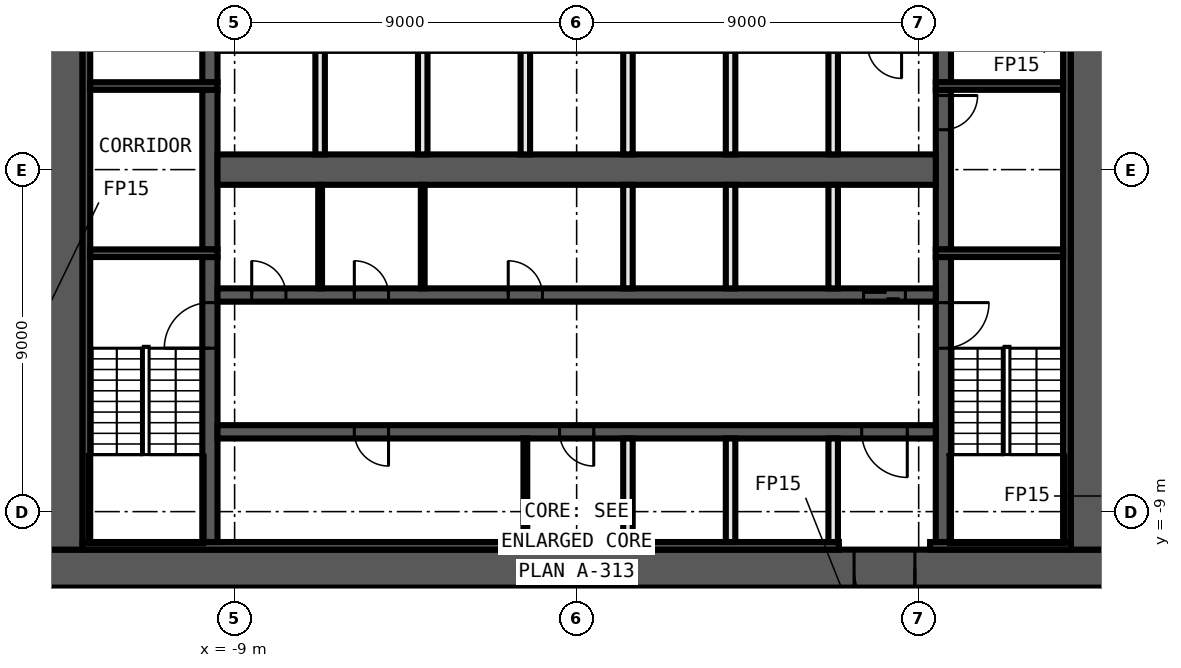
"""IFC4 building model, lengths in metres.
Left out: names, types, materials, properties, quantities, classifications, styles, units other than length and angle.
Written with IfcOpenShell. Run it as: python <this file> out.ifc"""

import sys

from ifc_helpers import new_model, si_unit, direction, frame, frame_2d, origin, place, context, subcontext, project, spatial, rectangle, extrude, element, fill, save


model = new_model("IFC4")
c1 = context("Model", 3, precision=1e-05, world=origin(), true_north=direction((0.0, 1.0)))
c2 = subcontext(c1, "Body", "Model", "MODEL_VIEW")
j1 = project(units=[si_unit("LENGTHUNIT", "METRE"), si_unit("PLANEANGLEUNIT", "RADIAN")], contexts=[c1])
p1 = place(None, origin())
s1 = spatial("IfcSite", under=j1, at=p1, CompositionType="ELEMENT")
p2 = place(p1, origin())
s2 = spatial("IfcBuilding", under=s1, at=p2, CompositionType="ELEMENT")
p3 = place(p2, frame((0.0, 0.0, 98.9)))
s3 = spatial("IfcBuildingStorey", under=s2, at=p3, CompositionType="ELEMENT", Elevation=98.9)
p4 = place(p3, frame((14.0, -10.5, 0.0), z_axis=(0.0, 0.0, 1.0), x_axis=(-1.0, 0.0, 0.0)))
e1 = element("IfcWall", 1, at=p4, inside=s3, PredefinedType="SHEAR", context=c2, shape_type="SweptSolid", body=[
    extrude(rectangle(XDim=28.0, YDim=1.0, at=frame_2d((14.0, 0.0))), origin(), (0.0, 0.0, 1.0), 3.25),
])
p5 = place(p4, frame((5.1, 0.0, 0.0)))
e2 = element("IfcOpeningElement", 2, at=p5, cuts=e1, PredefinedType="OPENING", context=c2, shape_type="SweptSolid", body=[
    extrude(rectangle(XDim=1.6, YDim=2.1, at=frame_2d((0.8, 1.05))), frame((0.0, 0.51, 0.0), z_axis=(0.0, -1.0, 0.0), x_axis=(1.0, 0.0, 0.0)), (0.0, 0.0, 1.0), 1.02),
])
for number, where, z_axis, x_axis in (
    (3, (13.5, 10.0, 0.0), (0.0, 0.0, 1.0), (0.0, -1.0, 0.0)),
    (4, (-13.5, -10.0, 0.0), (0.0, 0.0, 1.0), (0.0, 1.0, 0.0)),
):
    element("IfcWall", number, at=place(p3, frame(where, z_axis=z_axis, x_axis=x_axis)), inside=s3, PredefinedType="SHEAR", context=c2, shape_type="SweptSolid", body=[
        extrude(rectangle(XDim=20.0, YDim=1.0, at=frame_2d((10.0, 0.0))), origin(), (0.0, 0.0, 1.0), 3.25),
    ])
p6 = place(p3, frame((13.0, -9.9, 0.0), z_axis=(0.0, 0.0, 1.0), x_axis=(-1.0, 0.0, 0.0)))
e5 = element("IfcWall", 5, at=p6, inside=s3, PredefinedType="SHEAR", context=c2, shape_type="SweptSolid", body=[
    extrude(rectangle(XDim=3.7, YDim=0.2, at=frame_2d((1.85, 0.0))), origin(), (0.0, 0.0, 1.0), 3.25),
])
p7 = place(p3, frame((6.9, -9.9, 0.0), z_axis=(0.0, 0.0, 1.0), x_axis=(-1.0, 0.0, 0.0)))
e6 = element("IfcWall", 6, at=p7, inside=s3, PredefinedType="SHEAR", context=c2, shape_type="SweptSolid", body=[
    extrude(rectangle(XDim=19.9, YDim=0.2, at=frame_2d((9.95, 0.0))), origin(), (0.0, 0.0, 1.0), 3.25),
])
for number, where, z_axis, x_axis in (
    (7, (12.9, 9.8, 0.0), (0.0, 0.0, 1.0), (0.0, -1.0, 0.0)),
    (8, (-12.9, -9.8, 0.0), (0.0, 0.0, 1.0), (0.0, 1.0, 0.0)),
):
    element("IfcWall", number, at=place(p3, frame(where, z_axis=z_axis, x_axis=x_axis)), inside=s3, PredefinedType="SHEAR", context=c2, shape_type="SweptSolid", body=[
        extrude(rectangle(XDim=19.6, YDim=0.2, at=frame_2d((9.8, 0.0))), origin(), (0.0, 0.0, 1.0), 3.25),
    ])
p8 = place(p3, frame((9.65, -2.3, 0.0), z_axis=(0.0, 0.0, 1.0), x_axis=(0.0, -1.0, 0.0)))
e9 = element("IfcWall", 9, at=p8, inside=s3, PredefinedType="SHEAR", context=c2, shape_type="SweptSolid", body=[
    extrude(rectangle(XDim=7.5, YDim=0.4, at=frame_2d((3.75, 0.0))), origin(), (0.0, 0.0, 1.0), 3.25),
])
p9 = place(p8, frame((1.2, 0.0, 0.0)))
e10 = element("IfcOpeningElement", 10, at=p9, cuts=e9, PredefinedType="OPENING", context=c2, shape_type="SweptSolid", body=[
    extrude(rectangle(XDim=1.2, YDim=2.1, at=frame_2d((0.6, 1.05))), frame((0.0, 0.21, 0.0), z_axis=(0.0, -1.0, 0.0), x_axis=(1.0, 0.0, 0.0)), (0.0, 0.0, 1.0), 0.42),
])
p10 = place(p3, frame((9.65, 2.1, 0.0), z_axis=(0.0, 0.0, 1.0), x_axis=(0.0, -1.0, 0.0)))
e11 = element("IfcWall", 11, at=p10, inside=s3, PredefinedType="SHEAR", context=c2, shape_type="SweptSolid", body=[
    extrude(rectangle(XDim=4.2, YDim=0.4, at=frame_2d((2.1, 0.0))), origin(), (0.0, 0.0, 1.0), 3.25),
])
p11 = place(p10, frame((0.15, 0.0, 0.0)))
e12 = element("IfcOpeningElement", 12, at=p11, cuts=e11, PredefinedType="OPENING", context=c2, shape_type="SweptSolid", body=[
    extrude(rectangle(XDim=0.9, YDim=2.1, at=frame_2d((0.45, 1.05))), frame((0.0, 0.21, 0.0), z_axis=(0.0, -1.0, 0.0), x_axis=(1.0, 0.0, 0.0)), (0.0, 0.0, 1.0), 0.42),
])
p12 = place(p3, frame((9.65, 9.8, 0.0), z_axis=(0.0, 0.0, 1.0), x_axis=(0.0, -1.0, 0.0)))
e13 = element("IfcWall", 13, at=p12, inside=s3, PredefinedType="SHEAR", context=c2, shape_type="SweptSolid", body=[
    extrude(rectangle(XDim=7.5, YDim=0.4, at=frame_2d((3.75, 0.0))), origin(), (0.0, 0.0, 1.0), 3.25),
])
p13 = place(p12, frame((5.1, 0.0, 0.0)))
e14 = element("IfcOpeningElement", 14, at=p13, cuts=e13, PredefinedType="OPENING", context=c2, shape_type="SweptSolid", body=[
    extrude(rectangle(XDim=1.2, YDim=2.1, at=frame_2d((0.6, 1.05))), frame((0.0, 0.21, 0.0), z_axis=(0.0, -1.0, 0.0), x_axis=(1.0, 0.0, 0.0)), (0.0, 0.0, 1.0), 0.42),
])
p14 = place(p3, frame((-9.65, -9.8, 0.0), z_axis=(0.0, 0.0, 1.0), x_axis=(0.0, 1.0, 0.0)))
e15 = element("IfcWall", 15, at=p14, inside=s3, PredefinedType="SHEAR", context=c2, shape_type="SweptSolid", body=[
    extrude(rectangle(XDim=7.5, YDim=0.4, at=frame_2d((3.75, 0.0))), origin(), (0.0, 0.0, 1.0), 3.25),
])
p15 = place(p14, frame((5.1, 0.0, 0.0)))
e16 = element("IfcOpeningElement", 16, at=p15, cuts=e15, PredefinedType="OPENING", context=c2, shape_type="SweptSolid", body=[
    extrude(rectangle(XDim=1.2, YDim=2.1, at=frame_2d((0.6, 1.05))), frame((0.0, 0.21, 0.0), z_axis=(0.0, -1.0, 0.0), x_axis=(1.0, 0.0, 0.0)), (0.0, 0.0, 1.0), 0.42),
])
p16 = place(p3, frame((-9.65, -2.1, 0.0), z_axis=(0.0, 0.0, 1.0), x_axis=(0.0, 1.0, 0.0)))
e17 = element("IfcWall", 17, at=p16, inside=s3, PredefinedType="SHEAR", context=c2, shape_type="SweptSolid", body=[
    extrude(rectangle(XDim=4.2, YDim=0.4, at=frame_2d((2.1, 0.0))), origin(), (0.0, 0.0, 1.0), 3.25),
])
p17 = place(p3, frame((-9.65, 2.3, 0.0), z_axis=(0.0, 0.0, 1.0), x_axis=(0.0, 1.0, 0.0)))
e18 = element("IfcWall", 18, at=p17, inside=s3, PredefinedType="SHEAR", context=c2, shape_type="SweptSolid", body=[
    extrude(rectangle(XDim=7.5, YDim=0.4, at=frame_2d((3.75, 0.0))), origin(), (0.0, 0.0, 1.0), 3.25),
])
p18 = place(p17, frame((1.2, 0.0, 0.0)))
e19 = element("IfcOpeningElement", 19, at=p18, cuts=e18, PredefinedType="OPENING", context=c2, shape_type="SweptSolid", body=[
    extrude(rectangle(XDim=1.2, YDim=2.1, at=frame_2d((0.6, 1.05))), frame((0.0, 0.21, 0.0), z_axis=(0.0, -1.0, 0.0), x_axis=(1.0, 0.0, 0.0)), (0.0, 0.0, 1.0), 0.42),
])
for number, where, z_axis, x_axis in (
    (20, (9.45, 2.2, 0.0), (0.0, 0.0, 1.0), (1.0, 0.0, 0.0)),
    (21, (-9.45, 2.2, 0.0), (0.0, 0.0, 1.0), (-1.0, 0.0, 0.0)),
    (22, (9.45, -2.2, 0.0), (0.0, 0.0, 1.0), (1.0, 0.0, 0.0)),
    (23, (-9.45, -2.2, 0.0), (0.0, 0.0, 1.0), (-1.0, 0.0, 0.0)),
):
    element("IfcWall", number, at=place(p3, frame(where, z_axis=z_axis, x_axis=x_axis)), inside=s3, PredefinedType="SHEAR", context=c2, shape_type="SweptSolid", body=[
        extrude(rectangle(XDim=3.35, YDim=0.2, at=frame_2d((1.675, 0.0))), origin(), (0.0, 0.0, 1.0), 3.25),
    ])
p19 = place(p3, frame((-9.45, -3.3, 0.0), z_axis=(0.0, 0.0, 1.0), x_axis=(1.0, 0.0, 0.0)))
e24 = element("IfcWall", 24, at=p19, inside=s3, PredefinedType="SHEAR", context=c2, shape_type="SweptSolid", body=[
    extrude(rectangle(XDim=18.9, YDim=0.35, at=frame_2d((9.45, 0.0))), origin(), (0.0, 0.0, 1.0), 3.25),
])
p20 = place(p19, frame((17.0, 0.0, 0.0)))
e25 = element("IfcOpeningElement", 25, at=p20, cuts=e24, PredefinedType="OPENING", context=c2, shape_type="SweptSolid", body=[
    extrude(rectangle(XDim=1.1, YDim=2.1, at=frame_2d((0.55, 1.05))), frame((0.0, 0.185, 0.0), z_axis=(0.0, -1.0, 0.0), x_axis=(1.0, 0.0, 0.0)), (0.0, 0.0, 1.0), 0.37),
])
p21 = place(p19, frame((0.9, 0.0, 0.0)))
e26 = element("IfcOpeningElement", 26, at=p21, cuts=e24, PredefinedType="OPENING", context=c2, shape_type="SweptSolid", body=[
    extrude(rectangle(XDim=0.9, YDim=2.1, at=frame_2d((0.45, 1.05))), frame((0.0, 0.185, 0.0), z_axis=(0.0, -1.0, 0.0), x_axis=(1.0, 0.0, 0.0)), (0.0, 0.0, 1.0), 0.37),
])
p22 = place(p19, frame((3.6, 0.0, 0.0)))
e27 = element("IfcOpeningElement", 27, at=p22, cuts=e24, PredefinedType="OPENING", context=c2, shape_type="SweptSolid", body=[
    extrude(rectangle(XDim=0.9, YDim=2.1, at=frame_2d((0.45, 1.05))), frame((0.0, 0.185, 0.0), z_axis=(0.0, -1.0, 0.0), x_axis=(1.0, 0.0, 0.0)), (0.0, 0.0, 1.0), 0.37),
])
p23 = place(p19, frame((7.65, 0.0, 0.0)))
e28 = element("IfcOpeningElement", 28, at=p23, cuts=e24, PredefinedType="OPENING", context=c2, shape_type="SweptSolid", body=[
    extrude(rectangle(XDim=0.9, YDim=2.1, at=frame_2d((0.45, 1.05))), frame((0.0, 0.185, 0.0), z_axis=(0.0, -1.0, 0.0), x_axis=(1.0, 0.0, 0.0)), (0.0, 0.0, 1.0), 0.37),
])
p24 = place(p3, frame((9.45, -6.9, 0.0), z_axis=(0.0, 0.0, 1.0), x_axis=(-1.0, 0.0, 0.0)))
e29 = element("IfcWall", 29, at=p24, inside=s3, PredefinedType="SHEAR", context=c2, shape_type="SweptSolid", body=[
    extrude(rectangle(XDim=18.9, YDim=0.35, at=frame_2d((9.45, 0.0))), origin(), (0.0, 0.0, 1.0), 3.25),
])
p25 = place(p24, frame((0.75, 0.0, 0.0)))
e30 = element("IfcOpeningElement", 30, at=p25, cuts=e29, PredefinedType="OPENING", context=c2, shape_type="SweptSolid", body=[
    extrude(rectangle(XDim=1.2, YDim=2.1, at=frame_2d((0.6, 1.05))), frame((0.0, 0.185, 0.0), z_axis=(0.0, -1.0, 0.0), x_axis=(1.0, 0.0, 0.0)), (0.0, 0.0, 1.0), 0.37),
])
p26 = place(p24, frame((14.4, 0.0, 0.0)))
e31 = element("IfcOpeningElement", 31, at=p26, cuts=e29, PredefinedType="OPENING", context=c2, shape_type="SweptSolid", body=[
    extrude(rectangle(XDim=0.9, YDim=2.1, at=frame_2d((0.45, 1.05))), frame((0.0, 0.185, 0.0), z_axis=(0.0, -1.0, 0.0), x_axis=(1.0, 0.0, 0.0)), (0.0, 0.0, 1.0), 0.37),
])
p27 = place(p24, frame((9.0, 0.0, 0.0)))
e32 = element("IfcOpeningElement", 32, at=p27, cuts=e29, PredefinedType="OPENING", context=c2, shape_type="SweptSolid", body=[
    extrude(rectangle(XDim=0.9, YDim=2.1, at=frame_2d((0.45, 1.05))), frame((0.0, 0.185, 0.0), z_axis=(0.0, -1.0, 0.0), x_axis=(1.0, 0.0, 0.0)), (0.0, 0.0, 1.0), 0.37),
])
p28 = place(p3, frame((-9.45, 0.0, 0.0), z_axis=(0.0, 0.0, 1.0), x_axis=(1.0, 0.0, 0.0)))
e33 = element("IfcWall", 33, at=p28, inside=s3, PredefinedType="SHEAR", context=c2, shape_type="SweptSolid", body=[
    extrude(rectangle(XDim=18.9, YDim=0.8, at=frame_2d((9.45, 0.0))), origin(), (0.0, 0.0, 1.0), 3.25),
])
for number, where, z_axis, x_axis in (
    (34, (6.75, -9.8, 0.0), (0.0, 0.0, 1.0), (0.0, 1.0, 0.0)),
    (35, (6.75, -3.125, 0.0), (0.0, 0.0, 1.0), (0.0, 1.0, 0.0)),
    (36, (6.75, 0.4, 0.0), (0.0, 0.0, 1.0), (0.0, 1.0, 0.0)),
    (37, (4.05, -9.8, 0.0), (0.0, 0.0, 1.0), (0.0, 1.0, 0.0)),
    (38, (4.05, -3.125, 0.0), (0.0, 0.0, 1.0), (0.0, 1.0, 0.0)),
    (39, (4.05, 0.4, 0.0), (0.0, 0.0, 1.0), (0.0, 1.0, 0.0)),
    (40, (1.35, -9.8, 0.0), (0.0, 0.0, 1.0), (0.0, 1.0, 0.0)),
    (41, (1.35, -3.125, 0.0), (0.0, 0.0, 1.0), (0.0, 1.0, 0.0)),
    (42, (1.35, 0.4, 0.0), (0.0, 0.0, 1.0), (0.0, 1.0, 0.0)),
):
    element("IfcWall", number, at=place(p3, frame(where, z_axis=z_axis, x_axis=x_axis)), inside=s3, PredefinedType="SOLIDWALL", context=c2, shape_type="SweptSolid", body=[
        extrude(rectangle(XDim=2.725, YDim=0.25, at=frame_2d((1.363, 0.0))), origin(), (0.0, 0.0, 1.0), 3.25),
    ])
p29 = place(p3, frame((-1.35, -9.8, 0.0), z_axis=(0.0, 0.0, 1.0), x_axis=(0.0, 1.0, 0.0)))
e43 = element("IfcWall", 43, at=p29, inside=s3, PredefinedType="PARTITIONING", context=c2, shape_type="SweptSolid", body=[
    extrude(rectangle(XDim=2.725, YDim=0.1, at=frame_2d((1.363, 0.0))), origin(), (0.0, 0.0, 1.0), 3.25),
])
p30 = place(p3, frame((-1.35, 0.4, 0.0), z_axis=(0.0, 0.0, 1.0), x_axis=(0.0, 1.0, 0.0)))
e44 = element("IfcWall", 44, at=p30, inside=s3, PredefinedType="SOLIDWALL", context=c2, shape_type="SweptSolid", body=[
    extrude(rectangle(XDim=2.725, YDim=0.25, at=frame_2d((1.363, 0.0))), origin(), (0.0, 0.0, 1.0), 3.25),
])
p31 = place(p3, frame((-4.05, -3.125, 0.0), z_axis=(0.0, 0.0, 1.0), x_axis=(0.0, 1.0, 0.0)))
e45 = element("IfcWall", 45, at=p31, inside=s3, PredefinedType="PARTITIONING", context=c2, shape_type="SweptSolid", body=[
    extrude(rectangle(XDim=2.725, YDim=0.1, at=frame_2d((1.363, 0.0))), origin(), (0.0, 0.0, 1.0), 3.25),
])
p32 = place(p3, frame((-4.05, 0.4, 0.0), z_axis=(0.0, 0.0, 1.0), x_axis=(0.0, 1.0, 0.0)))
e46 = element("IfcWall", 46, at=p32, inside=s3, PredefinedType="SOLIDWALL", context=c2, shape_type="SweptSolid", body=[
    extrude(rectangle(XDim=2.725, YDim=0.25, at=frame_2d((1.363, 0.0))), origin(), (0.0, 0.0, 1.0), 3.25),
])
p33 = place(p3, frame((-6.75, -3.125, 0.0), z_axis=(0.0, 0.0, 1.0), x_axis=(0.0, 1.0, 0.0)))
e47 = element("IfcWall", 47, at=p33, inside=s3, PredefinedType="PARTITIONING", context=c2, shape_type="SweptSolid", body=[
    extrude(rectangle(XDim=2.725, YDim=0.1, at=frame_2d((1.363, 0.0))), origin(), (0.0, 0.0, 1.0), 3.25),
])
p34 = place(p3, frame((-6.75, 0.4, 0.0), z_axis=(0.0, 0.0, 1.0), x_axis=(0.0, 1.0, 0.0)))
e48 = element("IfcWall", 48, at=p34, inside=s3, PredefinedType="SOLIDWALL", context=c2, shape_type="SweptSolid", body=[
    extrude(rectangle(XDim=2.725, YDim=0.25, at=frame_2d((1.363, 0.0))), origin(), (0.0, 0.0, 1.0), 3.25),
])
p35 = place(p11, origin())
e49 = element("IfcDoor", 49, at=p35, inside=s3, OperationType="SINGLE_SWING_RIGHT", PredefinedType="DOOR", context=c2, shape_type="SweptSolid", body=[
    extrude(rectangle(XDim=0.9, YDim=2.1, at=frame_2d((0.45, 1.05))), frame((0.0, 0.025, 0.0), z_axis=(0.0, -1.0, 0.0), x_axis=(1.0, 0.0, 0.0)), (0.0, 0.0, 1.0), 0.05),
])
fill(e12, e49)
p36 = place(p20, origin())
e50 = element("IfcDoor", 50, at=p36, inside=s3, OperationType="DOUBLE_DOOR_SLIDING", PredefinedType="DOOR", context=c2, shape_type="SweptSolid", body=[
    extrude(rectangle(XDim=1.1, YDim=2.1, at=frame_2d((0.55, 1.05))), frame((0.0, 0.025, 0.0), z_axis=(0.0, -1.0, 0.0), x_axis=(1.0, 0.0, 0.0)), (0.0, 0.0, 1.0), 0.05),
])
fill(e25, e50)
p37 = place(p5, origin())
e51 = element("IfcDoor", 51, at=p37, inside=s3, OperationType="DOUBLE_DOOR_SINGLE_SWING", PredefinedType="DOOR", context=c2, shape_type="SweptSolid", body=[
    extrude(rectangle(XDim=1.6, YDim=2.1, at=frame_2d((0.8, 1.05))), frame((0.0, 0.025, 0.0), z_axis=(0.0, -1.0, 0.0), x_axis=(1.0, 0.0, 0.0)), (0.0, 0.0, 1.0), 0.05),
])
fill(e2, e51)
p38 = place(p25, origin())
e52 = element("IfcDoor", 52, at=p38, inside=s3, OperationType="SINGLE_SWING_LEFT", PredefinedType="DOOR", context=c2, shape_type="SweptSolid", body=[
    extrude(rectangle(XDim=1.2, YDim=2.1, at=frame_2d((0.6, 1.05))), frame((0.0, 0.025, 0.0), z_axis=(0.0, -1.0, 0.0), x_axis=(1.0, 0.0, 0.0)), (0.0, 0.0, 1.0), 0.05),
])
fill(e30, e52)
p39 = place(p21, origin())
e53 = element("IfcDoor", 53, at=p39, inside=s3, OperationType="SINGLE_SWING_RIGHT", PredefinedType="DOOR", context=c2, shape_type="SweptSolid", body=[
    extrude(rectangle(XDim=0.9, YDim=2.1, at=frame_2d((0.45, 1.05))), frame((0.0, 0.025, 0.0), z_axis=(0.0, -1.0, 0.0), x_axis=(1.0, 0.0, 0.0)), (0.0, 0.0, 1.0), 0.05),
])
fill(e26, e53)
p40 = place(p22, origin())
e54 = element("IfcDoor", 54, at=p40, inside=s3, OperationType="SINGLE_SWING_LEFT", PredefinedType="DOOR", context=c2, shape_type="SweptSolid", body=[
    extrude(rectangle(XDim=0.9, YDim=2.1, at=frame_2d((0.45, 1.05))), frame((0.0, 0.025, 0.0), z_axis=(0.0, -1.0, 0.0), x_axis=(1.0, 0.0, 0.0)), (0.0, 0.0, 1.0), 0.05),
])
fill(e27, e54)
p41 = place(p23, origin())
e55 = element("IfcDoor", 55, at=p41, inside=s3, OperationType="SINGLE_SWING_RIGHT", PredefinedType="DOOR", context=c2, shape_type="SweptSolid", body=[
    extrude(rectangle(XDim=0.9, YDim=2.1, at=frame_2d((0.45, 1.05))), frame((0.0, 0.025, 0.0), z_axis=(0.0, -1.0, 0.0), x_axis=(1.0, 0.0, 0.0)), (0.0, 0.0, 1.0), 0.05),
])
fill(e28, e55)
p42 = place(p26, origin())
e56 = element("IfcDoor", 56, at=p42, inside=s3, OperationType="SINGLE_SWING_LEFT", PredefinedType="DOOR", context=c2, shape_type="SweptSolid", body=[
    extrude(rectangle(XDim=0.9, YDim=2.1, at=frame_2d((0.45, 1.05))), frame((0.0, 0.025, 0.0), z_axis=(0.0, -1.0, 0.0), x_axis=(1.0, 0.0, 0.0)), (0.0, 0.0, 1.0), 0.05),
])
fill(e31, e56)
p43 = place(p27, origin())
e57 = element("IfcDoor", 57, at=p43, inside=s3, OperationType="SINGLE_SWING_RIGHT", PredefinedType="DOOR", context=c2, shape_type="SweptSolid", body=[
    extrude(rectangle(XDim=0.9, YDim=2.1, at=frame_2d((0.45, 1.05))), frame((0.0, 0.025, 0.0), z_axis=(0.0, -1.0, 0.0), x_axis=(1.0, 0.0, 0.0)), (0.0, 0.0, 1.0), 0.05),
])
fill(e32, e57)
p44 = place(p9, origin())
e58 = element("IfcDoor", 58, at=p44, inside=s3, OperationType="SINGLE_SWING_RIGHT", PredefinedType="DOOR", context=c2, shape_type="SweptSolid", body=[
    extrude(rectangle(XDim=1.2, YDim=2.1, at=frame_2d((0.6, 1.05))), frame((0.0, 0.025, 0.0), z_axis=(0.0, -1.0, 0.0), x_axis=(1.0, 0.0, 0.0)), (0.0, 0.0, 1.0), 0.05),
])
fill(e10, e58)
p45 = place(p15, origin())
e59 = element("IfcDoor", 59, at=p45, inside=s3, OperationType="SINGLE_SWING_LEFT", PredefinedType="DOOR", context=c2, shape_type="SweptSolid", body=[
    extrude(rectangle(XDim=1.2, YDim=2.1, at=frame_2d((0.6, 1.05))), frame((0.0, 0.025, 0.0), z_axis=(0.0, -1.0, 0.0), x_axis=(1.0, 0.0, 0.0)), (0.0, 0.0, 1.0), 0.05),
])
fill(e16, e59)
save(model, sys.argv[1])
